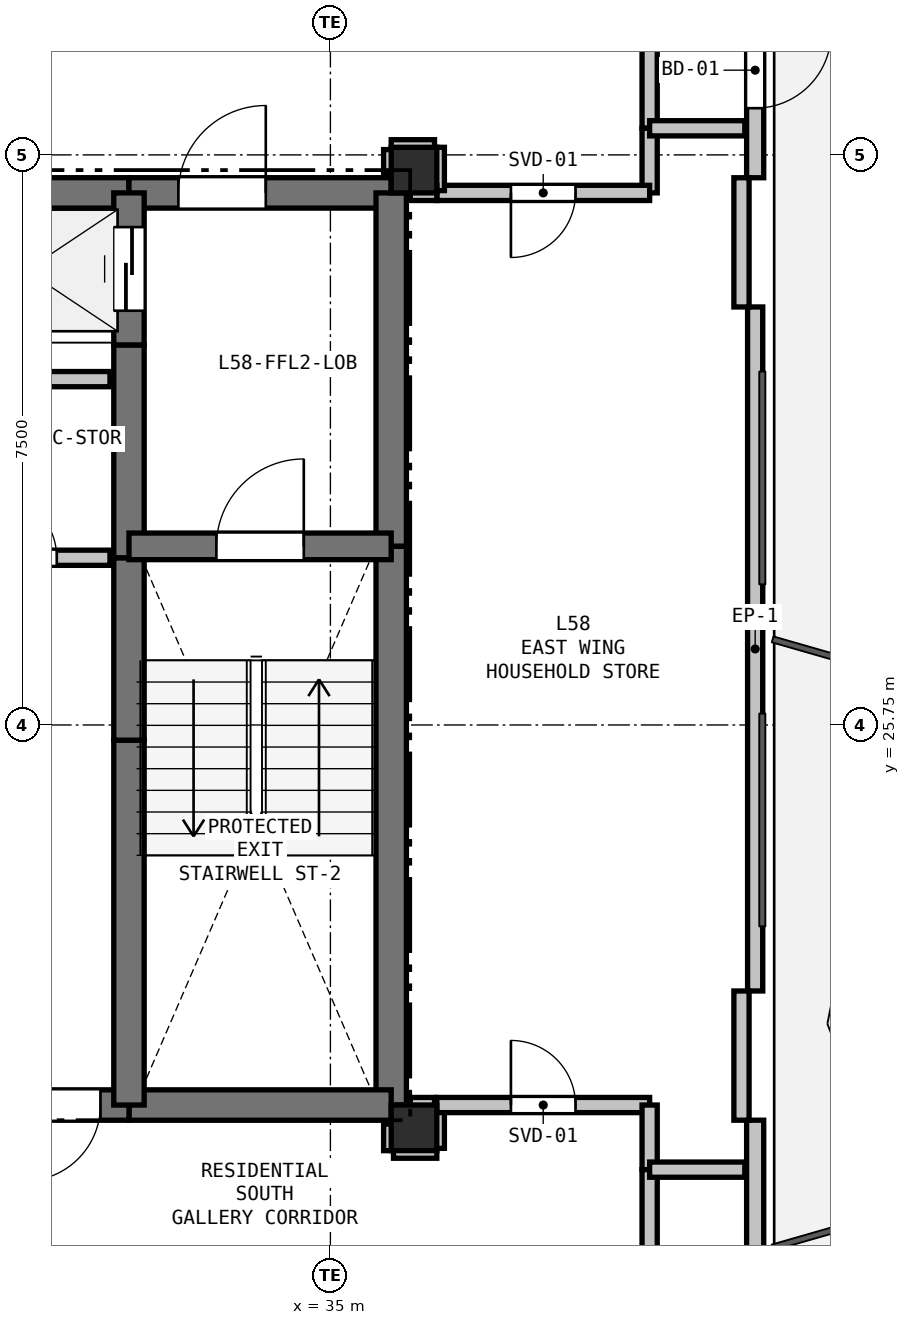
"""IFC4 building model, lengths in metres.
Left out: names, types, materials, properties, quantities, classifications, styles, units other than length and angle.
Written with IfcOpenShell. Run it as: python <this file> out.ifc"""

import sys

from ifc_helpers import new_model, si_unit, direction, frame, frame_2d, origin, origin_2d, place, context, subcontext, project, spatial, rectangle, extrude, element, fill, save


model = new_model("IFC4")
c1 = context("Model", 3, precision=1e-05, world=origin(), true_north=direction((0.0, 1.0)))
c2 = subcontext(c1, "Body", "Model", "MODEL_VIEW")
j1 = project(units=[si_unit("LENGTHUNIT", "METRE"), si_unit("PLANEANGLEUNIT", "RADIAN")], contexts=[c1])
p1 = place(None, origin())
s1 = spatial("IfcSite", under=j1, at=p1, CompositionType="ELEMENT")
p2 = place(p1, origin())
s2 = spatial("IfcBuilding", under=s1, at=p2, CompositionType="ELEMENT")
p3 = place(p2, frame((0.0, 0.0, 208.5)))
s3 = spatial("IfcBuildingStorey", under=s2, at=p3, CompositionType="ELEMENT", Elevation=208.5)
for number, where, z_axis, x_axis in (
    (1, (36.1, 33.05, 0.0), (0.0, 0.0, 1.0), (1.0, 0.0, 0.0)),
    (2, (36.1, 20.45, 0.0), (0.0, 0.0, 1.0), (1.0, 0.0, 0.0)),
):
    element("IfcColumn", number, at=place(p3, frame(where, z_axis=z_axis, x_axis=x_axis)), inside=s3, PredefinedType="COLUMN", context=c2, shape_type="SweptSolid", body=[
        extrude(rectangle(XDim=0.6, YDim=0.6, at=origin_2d()), origin(), (0.0, 0.0, 1.0), 3.3),
    ])
p4 = place(p3, frame((40.588, 42.648, 0.0), z_axis=(0.0, 0.0, 1.0), x_axis=(0.0, -1.0, 0.0)))
e3 = element("IfcWall", 3, at=p4, inside=s3, PredefinedType="SOLIDWALL", context=c2, shape_type="SweptSolid", body=[
    extrude(rectangle(XDim=9.699, YDim=0.225, at=frame_2d((4.85, 0.0))), origin(), (0.0, 0.0, 1.0), 2.69),
])
p5 = place(p4, frame((7.784, 0.0, 0.0)))
e4 = element("IfcOpeningElement", 4, at=p5, cuts=e3, PredefinedType="OPENING", context=c2, shape_type="SweptSolid", body=[
    extrude(rectangle(XDim=1.0, YDim=2.1, at=frame_2d((0.5, 1.05))), frame((0.0, 0.123, 0.0), z_axis=(0.0, -1.0, 0.0), x_axis=(1.0, 0.0, 0.0)), (0.0, 0.0, 1.0), 0.245),
])
p6 = place(p4, frame((5.252, 0.0, 0.9)))
e5 = element("IfcOpeningElement", 5, at=p6, cuts=e3, PredefinedType="OPENING", context=c2, shape_type="SweptSolid", body=[
    extrude(rectangle(XDim=1.2, YDim=1.4, at=frame_2d((0.6, 0.7))), frame((0.0, 0.123, 0.0), z_axis=(0.0, -1.0, 0.0), x_axis=(1.0, 0.0, 0.0)), (0.0, 0.0, 1.0), 0.245),
])
p7 = place(p3, frame((40.588, 31.25, 0.0), z_axis=(0.0, 0.0, 1.0), x_axis=(0.0, -1.0, 0.0)))
e6 = element("IfcWall", 6, at=p7, inside=s3, PredefinedType="PARAPET", context=c2, shape_type="SweptSolid", body=[
    extrude(rectangle(XDim=8.999, YDim=0.2, at=frame_2d((4.5, 0.0))), origin(), (0.0, 0.0, 1.0), 0.2),
])
p8 = place(p3, frame((40.588, 20.551, 0.0), z_axis=(0.0, 0.0, 1.0), x_axis=(0.0, -1.0, 0.0)))
e7 = element("IfcWall", 7, at=p8, inside=s3, PredefinedType="SOLIDWALL", context=c2, shape_type="SweptSolid", body=[
    extrude(rectangle(XDim=9.699, YDim=0.225, at=frame_2d((4.85, 0.0))), origin(), (0.0, 0.0, 1.0), 2.69),
])
p9 = place(p8, frame((7.735, 0.0, 0.9)))
e8 = element("IfcOpeningElement", 8, at=p9, cuts=e7, PredefinedType="OPENING", context=c2, shape_type="SweptSolid", body=[
    extrude(rectangle(XDim=1.2, YDim=1.4, at=frame_2d((0.6, 0.7))), frame((0.0, 0.123, 0.0), z_axis=(0.0, -1.0, 0.0), x_axis=(1.0, 0.0, 0.0)), (0.0, 0.0, 1.0), 0.245),
])
for number, where, z_axis, x_axis in (
    (9, (40.408, 32.949, 0.0), (0.0, 0.0, 1.0), (0.0, -1.0, 0.0)),
    (10, (40.408, 22.25, 0.0), (0.0, 0.0, 1.0), (0.0, -1.0, 0.0)),
):
    element("IfcWall", number, at=place(p3, frame(where, z_axis=z_axis, x_axis=x_axis)), inside=s3, PredefinedType="PARAPET", context=c2, shape_type="SweptSolid", body=[
        extrude(rectangle(XDim=1.7, YDim=0.2, at=frame_2d((0.85, 0.0))), origin(), (0.0, 0.0, 1.0), 2.69),
    ])
p10 = place(p3, frame((29.65, 32.75, 0.0), z_axis=(0.0, 0.0, 1.0), x_axis=(1.0, 0.0, 0.0)))
e11 = element("IfcWall", 11, at=p10, inside=s3, PredefinedType="SHEAR", context=c2, shape_type="SweptSolid", body=[
    extrude(rectangle(XDim=2.7, YDim=0.4, at=frame_2d((1.35, 0.0))), origin(), (0.0, 0.0, 1.0), 3.07),
])
p11 = place(p3, frame((32.35, 32.75, 0.0), z_axis=(0.0, 0.0, 1.0), x_axis=(1.0, 0.0, 0.0)))
e12 = element("IfcWall", 12, at=p11, inside=s3, PredefinedType="SHEAR", context=c2, shape_type="SweptSolid", body=[
    extrude(rectangle(XDim=3.45, YDim=0.4, at=frame_2d((1.725, 0.0))), origin(), (0.0, 0.0, 1.0), 3.07),
])
p12 = place(p11, frame((0.65, 0.0, 0.0)))
e13 = element("IfcOpeningElement", 13, at=p12, cuts=e12, PredefinedType="OPENING", context=c2, shape_type="SweptSolid", body=[
    extrude(rectangle(XDim=1.15, YDim=2.15, at=frame_2d((0.575, 1.075))), frame((0.0, 0.21, 0.0), z_axis=(0.0, -1.0, 0.0), x_axis=(1.0, 0.0, 0.0)), (0.0, 0.0, 1.0), 0.42),
])
p13 = place(p3, frame((35.8, 32.75, 0.0), z_axis=(0.0, 0.0, 1.0), x_axis=(0.0, -1.0, 0.0)))
e14 = element("IfcWall", 14, at=p13, inside=s3, PredefinedType="SHEAR", context=c2, shape_type="SweptSolid", body=[
    extrude(rectangle(XDim=4.65, YDim=0.4, at=frame_2d((2.325, 0.0))), origin(), (0.0, 0.0, 1.0), 3.07),
])
p14 = place(p3, frame((35.8, 28.1, 0.0), z_axis=(0.0, 0.0, 1.0), x_axis=(0.0, -1.0, 0.0)))
e15 = element("IfcWall", 15, at=p14, inside=s3, PredefinedType="SHEAR", context=c2, shape_type="SweptSolid", body=[
    extrude(rectangle(XDim=7.35, YDim=0.4, at=frame_2d((3.675, 0.0))), origin(), (0.0, 0.0, 1.0), 3.07),
])
p15 = place(p3, frame((35.8, 20.75, 0.0), z_axis=(0.0, 0.0, 1.0), x_axis=(-1.0, 0.0, 0.0)))
e16 = element("IfcWall", 16, at=p15, inside=s3, PredefinedType="SHEAR", context=c2, shape_type="SweptSolid", body=[
    extrude(rectangle(XDim=3.45, YDim=0.4, at=frame_2d((1.725, 0.0))), origin(), (0.0, 0.0, 1.0), 3.07),
])
p16 = place(p3, frame((32.35, 20.75, 0.0), z_axis=(0.0, 0.0, 1.0), x_axis=(-1.0, 0.0, 0.0)))
e17 = element("IfcWall", 17, at=p16, inside=s3, PredefinedType="SHEAR", context=c2, shape_type="SweptSolid", body=[
    extrude(rectangle(XDim=1.75, YDim=0.4, at=frame_2d((0.875, 0.0))), origin(), (0.0, 0.0, 1.0), 3.07),
])
p17 = place(p16, frame((0.375, 0.0, 0.0)))
e18 = element("IfcOpeningElement", 18, at=p17, cuts=e17, PredefinedType="OPENING", context=c2, shape_type="SweptSolid", body=[
    extrude(rectangle(XDim=1.0, YDim=2.15, at=frame_2d((0.5, 1.075))), frame((0.0, 0.21, 0.0), z_axis=(0.0, -1.0, 0.0), x_axis=(1.0, 0.0, 0.0)), (0.0, 0.0, 1.0), 0.42),
])
p18 = place(p3, frame((32.35, 20.75, 0.0), z_axis=(0.0, 0.0, 1.0), x_axis=(0.0, 1.0, 0.0)))
e19 = element("IfcWall", 19, at=p18, inside=s3, PredefinedType="SHEAR", context=c2, shape_type="SweptSolid", body=[
    extrude(rectangle(XDim=4.8, YDim=0.4, at=frame_2d((2.4, 0.0))), origin(), (0.0, 0.0, 1.0), 3.07),
])
p19 = place(p3, frame((32.35, 25.55, 0.0), z_axis=(0.0, 0.0, 1.0), x_axis=(0.0, 1.0, 0.0)))
e20 = element("IfcWall", 20, at=p19, inside=s3, PredefinedType="SHEAR", context=c2, shape_type="SweptSolid", body=[
    extrude(rectangle(XDim=2.4, YDim=0.4, at=frame_2d((1.2, 0.0))), origin(), (0.0, 0.0, 1.0), 3.07),
])
p20 = place(p3, frame((32.35, 27.95, 0.0), z_axis=(0.0, 0.0, 1.0), x_axis=(0.0, 1.0, 0.0)))
e21 = element("IfcWall", 21, at=p20, inside=s3, PredefinedType="SHEAR", context=c2, shape_type="SweptSolid", body=[
    extrude(rectangle(XDim=2.8, YDim=0.4, at=frame_2d((1.4, 0.0))), origin(), (0.0, 0.0, 1.0), 3.07),
])
p21 = place(p3, frame((32.35, 30.75, 0.0), z_axis=(0.0, 0.0, 1.0), x_axis=(0.0, 1.0, 0.0)))
e22 = element("IfcWall", 22, at=p21, inside=s3, PredefinedType="SHEAR", context=c2, shape_type="SweptSolid", body=[
    extrude(rectangle(XDim=2.0, YDim=0.4, at=frame_2d((1.0, 0.0))), origin(), (0.0, 0.0, 1.0), 3.07),
])
p22 = place(p21, frame((0.45, 0.0, 0.0)))
e23 = element("IfcOpeningElement", 23, at=p22, cuts=e22, PredefinedType="OPENING", context=c2, shape_type="SweptSolid", body=[
    extrude(rectangle(XDim=1.1, YDim=2.15, at=frame_2d((0.55, 1.075))), frame((0.0, 0.21, 0.0), z_axis=(0.0, -1.0, 0.0), x_axis=(1.0, 0.0, 0.0)), (0.0, 0.0, 1.0), 0.42),
])
p23 = place(p3, frame((32.35, 28.1, 0.0), z_axis=(0.0, 0.0, 1.0), x_axis=(1.0, 0.0, 0.0)))
e24 = element("IfcWall", 24, at=p23, inside=s3, PredefinedType="SHEAR", context=c2, shape_type="SweptSolid", body=[
    extrude(rectangle(XDim=3.45, YDim=0.35, at=frame_2d((1.725, 0.0))), origin(), (0.0, 0.0, 1.0), 3.07),
])
p24 = place(p23, frame((1.15, 0.0, 0.0)))
e25 = element("IfcOpeningElement", 25, at=p24, cuts=e24, PredefinedType="OPENING", context=c2, shape_type="SweptSolid", body=[
    extrude(rectangle(XDim=1.15, YDim=2.15, at=frame_2d((0.575, 1.075))), frame((0.0, 0.185, 0.0), z_axis=(0.0, -1.0, 0.0), x_axis=(1.0, 0.0, 0.0)), (0.0, 0.0, 1.0), 0.37),
])
p25 = place(p3, frame((32.1, 30.3, 0.0), z_axis=(0.0, 0.0, 1.0), x_axis=(-1.0, 0.0, 0.0)))
e26 = element("IfcWall", 26, at=p25, inside=s3, PredefinedType="PARTITIONING", context=c2, shape_type="SweptSolid", body=[
    extrude(rectangle(XDim=2.25, YDim=0.2, at=frame_2d((1.125, 0.0))), origin(), (0.0, 0.0, 1.0), 3.07),
])
p26 = place(p3, frame((29.85, 27.95, 0.0), z_axis=(0.0, 0.0, 1.0), x_axis=(1.0, 0.0, 0.0)))
e27 = element("IfcWall", 27, at=p26, inside=s3, PredefinedType="PARTITIONING", context=c2, shape_type="SweptSolid", body=[
    extrude(rectangle(XDim=2.25, YDim=0.2, at=frame_2d((1.125, 0.0))), origin(), (0.0, 0.0, 1.0), 3.07),
])
p27 = place(p26, frame((0.7, 0.0, 0.0)))
e28 = element("IfcOpeningElement", 28, at=p27, cuts=e27, PredefinedType="OPENING", context=c2, shape_type="SweptSolid", body=[
    extrude(rectangle(XDim=0.85, YDim=2.1, at=frame_2d((0.425, 1.05))), frame((0.0, 0.11, 0.0), z_axis=(0.0, -1.0, 0.0), x_axis=(1.0, 0.0, 0.0)), (0.0, 0.0, 1.0), 0.22),
])
p28 = place(p3, frame((39.2, 35.2, 0.0), z_axis=(0.0, 0.0, 1.0), x_axis=(0.0, -1.0, 0.0)))
e29 = element("IfcWall", 29, at=p28, inside=s3, PredefinedType="PARTITIONING", context=c2, shape_type="SweptSolid", body=[
    extrude(rectangle(XDim=1.6, YDim=0.2, at=frame_2d((0.8, 0.0))), origin(), (0.0, 0.0, 1.0), 3.07),
])
p29 = place(p3, frame((39.2, 33.6, 0.0), z_axis=(0.0, 0.0, 1.0), x_axis=(0.0, -1.0, 0.0)))
e30 = element("IfcWall", 30, at=p29, inside=s3, PredefinedType="PARTITIONING", context=c2, shape_type="SweptSolid", body=[
    extrude(rectangle(XDim=0.85, YDim=0.2, at=frame_2d((0.425, 0.0))), origin(), (0.0, 0.0, 1.0), 3.07),
])
p30 = place(p3, frame((39.2, 32.75, 0.0), z_axis=(0.0, 0.0, 1.0), x_axis=(-1.0, 0.0, 0.0)))
e31 = element("IfcWall", 31, at=p30, inside=s3, PredefinedType="PARTITIONING", context=c2, shape_type="SweptSolid", body=[
    extrude(rectangle(XDim=2.8, YDim=0.2, at=frame_2d((1.4, 0.0))), origin(), (0.0, 0.0, 1.0), 3.07),
])
p31 = place(p30, frame((0.975, 0.0, 0.0)))
e32 = element("IfcOpeningElement", 32, at=p31, cuts=e31, PredefinedType="OPENING", context=c2, shape_type="SweptSolid", body=[
    extrude(rectangle(XDim=0.85, YDim=2.1, at=frame_2d((0.425, 1.05))), frame((0.0, 0.11, 0.0), z_axis=(0.0, -1.0, 0.0), x_axis=(1.0, 0.0, 0.0)), (0.0, 0.0, 1.0), 0.22),
])
for number, where, z_axis, x_axis in (
    (33, (36.4, 32.78, 0.0), (0.0, 0.0, 1.0), (0.0, 1.0, 0.0)),
    (34, (36.37, 33.35, 0.0), (0.0, 0.0, 1.0), (-1.0, 0.0, 0.0)),
):
    element("IfcWall", number, at=place(p3, frame(where, z_axis=z_axis, x_axis=x_axis)), inside=s3, PredefinedType="PARTITIONING", context=c2, shape_type="SweptSolid", body=[
        extrude(rectangle(XDim=0.57, YDim=0.2, at=frame_2d((0.285, 0.0))), origin(), (0.0, 0.0, 1.0), 2.518),
    ])
p32 = place(p3, frame((35.8, 33.32, 0.0), z_axis=(0.0, 0.0, 1.0), x_axis=(0.0, -1.0, 0.0)))
e35 = element("IfcWall", 35, at=p32, inside=s3, PredefinedType="PARTITIONING", context=c2, shape_type="SweptSolid", body=[
    extrude(rectangle(XDim=0.32, YDim=0.2, at=frame_2d((0.16, 0.0))), origin(), (0.0, 0.0, 1.0), 2.595),
])
p33 = place(p3, frame((35.8, 20.5, 0.0), z_axis=(0.0, 0.0, 1.0), x_axis=(0.0, -1.0, 0.0)))
e36 = element("IfcWall", 36, at=p33, inside=s3, PredefinedType="PARTITIONING", context=c2, shape_type="SweptSolid", body=[
    extrude(rectangle(XDim=0.35, YDim=0.2, at=frame_2d((0.175, 0.0))), origin(), (0.0, 0.0, 1.0), 2.595),
])
p34 = place(p3, frame((35.83, 20.15, 0.0), z_axis=(0.0, 0.0, 1.0), x_axis=(1.0, 0.0, 0.0)))
e37 = element("IfcWall", 37, at=p34, inside=s3, PredefinedType="PARTITIONING", context=c2, shape_type="SweptSolid", body=[
    extrude(rectangle(XDim=0.57, YDim=0.2, at=frame_2d((0.285, 0.0))), origin(), (0.0, 0.0, 1.0), 2.518),
])
p35 = place(p3, frame((36.4, 20.18, 0.0), z_axis=(0.0, 0.0, 1.0), x_axis=(0.0, 1.0, 0.0)))
e38 = element("IfcWall", 38, at=p35, inside=s3, PredefinedType="PARTITIONING", context=c2, shape_type="SweptSolid", body=[
    extrude(rectangle(XDim=0.57, YDim=0.2, at=frame_2d((0.285, 0.0))), origin(), (0.0, 0.0, 1.0), 3.07),
])
p36 = place(p3, frame((36.4, 20.75, 0.0), z_axis=(0.0, 0.0, 1.0), x_axis=(1.0, 0.0, 0.0)))
e39 = element("IfcWall", 39, at=p36, inside=s3, PredefinedType="PARTITIONING", context=c2, shape_type="SweptSolid", body=[
    extrude(rectangle(XDim=2.8, YDim=0.2, at=frame_2d((1.4, 0.0))), origin(), (0.0, 0.0, 1.0), 3.07),
])
p37 = place(p36, frame((0.975, 0.0, 0.0)))
e40 = element("IfcOpeningElement", 40, at=p37, cuts=e39, PredefinedType="OPENING", context=c2, shape_type="SweptSolid", body=[
    extrude(rectangle(XDim=0.85, YDim=2.1, at=frame_2d((0.425, 1.05))), frame((0.0, 0.11, 0.0), z_axis=(0.0, -1.0, 0.0), x_axis=(1.0, 0.0, 0.0)), (0.0, 0.0, 1.0), 0.22),
])
p38 = place(p3, frame((39.2, 20.75, 0.0), z_axis=(0.0, 0.0, 1.0), x_axis=(0.0, -1.0, 0.0)))
e41 = element("IfcWall", 41, at=p38, inside=s3, PredefinedType="PARTITIONING", context=c2, shape_type="SweptSolid", body=[
    extrude(rectangle(XDim=0.85, YDim=0.2, at=frame_2d((0.425, 0.0))), origin(), (0.0, 0.0, 1.0), 3.07),
])
p39 = place(p3, frame((39.2, 19.9, 0.0), z_axis=(0.0, 0.0, 1.0), x_axis=(0.0, -1.0, 0.0)))
e42 = element("IfcWall", 42, at=p39, inside=s3, PredefinedType="PARTITIONING", context=c2, shape_type="SweptSolid", body=[
    extrude(rectangle(XDim=1.6, YDim=0.2, at=frame_2d((0.8, 0.0))), origin(), (0.0, 0.0, 1.0), 3.07),
])
p40 = place(p3, frame((36.37, 20.75, 0.0), z_axis=(0.0, 0.0, 1.0), x_axis=(-1.0, 0.0, 0.0)))
e43 = element("IfcWall", 43, at=p40, inside=s3, PredefinedType="PARTITIONING", context=c2, shape_type="SweptSolid", body=[
    extrude(rectangle(XDim=0.32, YDim=0.2, at=frame_2d((0.16, 0.0))), origin(), (0.0, 0.0, 1.0), 2.595),
])
p41 = place(p3, frame((36.05, 32.75, 0.0), z_axis=(0.0, 0.0, 1.0), x_axis=(1.0, 0.0, 0.0)))
e44 = element("IfcWall", 44, at=p41, inside=s3, PredefinedType="PARTITIONING", context=c2, shape_type="SweptSolid", body=[
    extrude(rectangle(XDim=0.35, YDim=0.2, at=frame_2d((0.175, 0.0))), origin(), (0.0, 0.0, 1.0), 2.595),
])
for number, where, z_axis, x_axis in (
    (45, (39.2, 33.6, 0.0), (0.0, 0.0, 1.0), (1.0, 0.0, 0.0)),
    (46, (40.452, 19.9, 0.0), (0.0, 0.0, 1.0), (-1.0, 0.0, 0.0)),
):
    element("IfcWall", number, at=place(p3, frame(where, z_axis=z_axis, x_axis=x_axis)), inside=s3, PredefinedType="PARTITIONING", context=c2, shape_type="SweptSolid", body=[
        extrude(rectangle(XDim=1.252, YDim=0.2, at=frame_2d((0.626, 0.0))), origin(), (0.0, 0.0, 1.0), 2.365),
    ])
p42 = place(p5, origin())
e47 = element("IfcDoor", 47, at=p42, inside=s3, OperationType="SINGLE_SWING_LEFT", PredefinedType="DOOR", context=c2, shape_type="SweptSolid", body=[
    extrude(rectangle(XDim=1.0, YDim=2.1, at=frame_2d((0.5, 1.05))), frame((0.0, 0.025, 0.0), z_axis=(0.0, -1.0, 0.0), x_axis=(1.0, 0.0, 0.0)), (0.0, 0.0, 1.0), 0.05),
])
fill(e4, e47)
p43 = place(p17, origin())
e48 = element("IfcDoor", 48, at=p43, inside=s3, OperationType="SINGLE_SWING_RIGHT", PredefinedType="DOOR", context=c2, shape_type="SweptSolid", body=[
    extrude(rectangle(XDim=1.0, YDim=2.15, at=frame_2d((0.5, 1.075))), frame((0.0, 0.025, 0.0), z_axis=(0.0, -1.0, 0.0), x_axis=(1.0, 0.0, 0.0)), (0.0, 0.0, 1.0), 0.05),
])
fill(e18, e48)
p44 = place(p22, origin())
e49 = element("IfcDoor", 49, at=p44, inside=s3, OperationType="SLIDING_TO_LEFT", PredefinedType="DOOR", context=c2, shape_type="SweptSolid", body=[
    extrude(rectangle(XDim=1.1, YDim=2.15, at=frame_2d((0.55, 1.075))), frame((0.0, 0.025, 0.0), z_axis=(0.0, -1.0, 0.0), x_axis=(1.0, 0.0, 0.0)), (0.0, 0.0, 1.0), 0.05),
])
fill(e23, e49)
p45 = place(p24, origin())
e50 = element("IfcDoor", 50, at=p45, inside=s3, OperationType="SINGLE_SWING_RIGHT", PredefinedType="DOOR", context=c2, shape_type="SweptSolid", body=[
    extrude(rectangle(XDim=1.15, YDim=2.15, at=frame_2d((0.575, 1.075))), frame((0.0, 0.025, 0.0), z_axis=(0.0, -1.0, 0.0), x_axis=(1.0, 0.0, 0.0)), (0.0, 0.0, 1.0), 0.05),
])
fill(e25, e50)
p46 = place(p12, origin())
e51 = element("IfcDoor", 51, at=p46, inside=s3, OperationType="SINGLE_SWING_RIGHT", PredefinedType="DOOR", context=c2, shape_type="SweptSolid", body=[
    extrude(rectangle(XDim=1.15, YDim=2.15, at=frame_2d((0.575, 1.075))), frame((0.0, 0.025, 0.0), z_axis=(0.0, -1.0, 0.0), x_axis=(1.0, 0.0, 0.0)), (0.0, 0.0, 1.0), 0.05),
])
fill(e13, e51)
p47 = place(p27, origin())
e52 = element("IfcDoor", 52, at=p47, inside=s3, OperationType="SINGLE_SWING_LEFT", PredefinedType="DOOR", context=c2, shape_type="SweptSolid", body=[
    extrude(rectangle(XDim=0.85, YDim=2.1, at=frame_2d((0.425, 1.05))), frame((0.0, 0.025, 0.0), z_axis=(0.0, -1.0, 0.0), x_axis=(1.0, 0.0, 0.0)), (0.0, 0.0, 1.0), 0.05),
])
fill(e28, e52)
p48 = place(p31, origin())
e53 = element("IfcDoor", 53, at=p48, inside=s3, OperationType="SINGLE_SWING_RIGHT", PredefinedType="DOOR", context=c2, shape_type="SweptSolid", body=[
    extrude(rectangle(XDim=0.85, YDim=2.1, at=frame_2d((0.425, 1.05))), frame((0.0, 0.025, 0.0), z_axis=(0.0, -1.0, 0.0), x_axis=(1.0, 0.0, 0.0)), (0.0, 0.0, 1.0), 0.05),
])
fill(e32, e53)
p49 = place(p37, origin())
e54 = element("IfcDoor", 54, at=p49, inside=s3, OperationType="SINGLE_SWING_LEFT", PredefinedType="DOOR", context=c2, shape_type="SweptSolid", body=[
    extrude(rectangle(XDim=0.85, YDim=2.1, at=frame_2d((0.425, 1.05))), frame((0.0, 0.025, 0.0), z_axis=(0.0, -1.0, 0.0), x_axis=(1.0, 0.0, 0.0)), (0.0, 0.0, 1.0), 0.05),
])
fill(e40, e54)
save(model, sys.argv[1])
